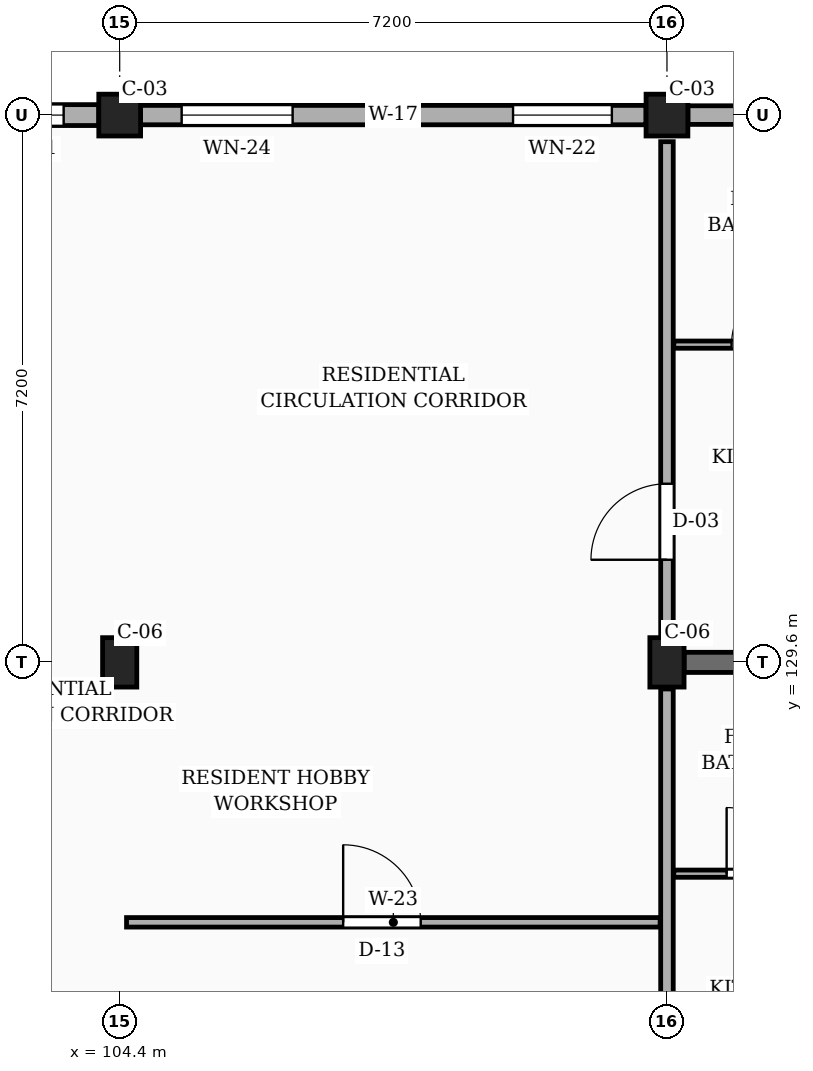
"""IFC4 building model, lengths in metres.
Left out: names, types, materials, properties, quantities, classifications, styles, units other than length and angle.
Written with IfcOpenShell. Run it as: python <this file> out.ifc"""

import sys

from ifc_helpers import new_model, si_unit, direction, frame, frame_2d, origin, origin_2d, place, context, subcontext, project, spatial, rectangle, extrude, element, fill, save


model = new_model("IFC4")
c1 = context("Model", 3, precision=1e-05, world=origin(), true_north=direction((0.0, 1.0)))
c2 = subcontext(c1, "Body", "Model", "MODEL_VIEW")
j1 = project(units=[si_unit("LENGTHUNIT", "METRE"), si_unit("PLANEANGLEUNIT", "RADIAN")], contexts=[c1])
p1 = place(None, origin())
s1 = spatial("IfcSite", under=j1, at=p1, CompositionType="ELEMENT")
p2 = place(p1, origin())
s2 = spatial("IfcBuilding", under=s1, at=p2, CompositionType="ELEMENT")
p3 = place(p2, frame((0.0, 0.0, 10.8)))
s3 = spatial("IfcBuildingStorey", under=s2, at=p3, CompositionType="ELEMENT", Elevation=10.8)
p4 = place(p3, frame((104.4, 129.6, 0.0), z_axis=(0.0, 0.0, 1.0), x_axis=(1.0, 0.0, 0.0)))
e1 = element("IfcColumn", 1, at=p4, inside=s3, PredefinedType="COLUMN", context=c2, shape_type="SweptSolid", body=[
    extrude(rectangle(XDim=0.45, YDim=0.65, at=origin_2d()), origin(), (0.0, 0.0, 1.0), 3.15),
])
p5 = place(p3, frame((104.4, 136.8, 0.0), z_axis=(0.0, 0.0, 1.0), x_axis=(1.0, 0.0, 0.0)))
e2 = element("IfcColumn", 2, at=p5, inside=s3, PredefinedType="COLUMN", context=c2, shape_type="SweptSolid", body=[
    extrude(rectangle(XDim=0.55, YDim=0.55, at=origin_2d()), origin(), (0.0, 0.0, 1.0), 3.15),
])
p6 = place(p3, frame((111.6, 129.6, 0.0), z_axis=(0.0, 0.0, 1.0), x_axis=(1.0, 0.0, 0.0)))
e3 = element("IfcColumn", 3, at=p6, inside=s3, PredefinedType="COLUMN", context=c2, shape_type="SweptSolid", body=[
    extrude(rectangle(XDim=0.45, YDim=0.65, at=origin_2d()), origin(), (0.0, 0.0, 1.0), 3.15),
])
p7 = place(p3, frame((111.6, 136.8, 0.0), z_axis=(0.0, 0.0, 1.0), x_axis=(1.0, 0.0, 0.0)))
e4 = element("IfcColumn", 4, at=p7, inside=s3, PredefinedType="COLUMN", context=c2, shape_type="SweptSolid", body=[
    extrude(rectangle(XDim=0.55, YDim=0.55, at=origin_2d()), origin(), (0.0, 0.0, 1.0), 3.15),
])
p8 = place(p3, frame((111.825, 129.6, 0.0), z_axis=(0.0, 0.0, 1.0), x_axis=(1.0, 0.0, 0.0)))
e5 = element("IfcWall", 5, at=p8, inside=s3, PredefinedType="SOLIDWALL", context=c2, shape_type="SweptSolid", body=[
    extrude(rectangle(XDim=6.7, YDim=0.265, at=frame_2d((3.35, 0.0))), origin(), (0.0, 0.0, 1.0), 2.19),
])
p9 = place(p3, frame((118.525, 136.8, 0.0), z_axis=(0.0, 0.0, 1.0), x_axis=(-1.0, 0.0, 0.0)))
e6 = element("IfcWall", 6, at=p9, inside=s3, PredefinedType="SOLIDWALL", context=c2, shape_type="SweptSolid", body=[
    extrude(rectangle(XDim=6.65, YDim=0.245, at=frame_2d((3.325, 0.0))), origin(), (0.0, 0.0, 1.0), 2.46),
])
p10 = place(p9, frame((0.45, 0.0, 0.78)))
e7 = element("IfcOpeningElement", 7, at=p10, cuts=e6, PredefinedType="OPENING", context=c2, shape_type="SweptSolid", body=[
    extrude(rectangle(XDim=1.14, YDim=1.36, at=frame_2d((0.57, 0.68))), frame((0.0, 0.133, 0.0), z_axis=(0.0, -1.0, 0.0), x_axis=(1.0, 0.0, 0.0)), (0.0, 0.0, 1.0), 0.265),
])
p11 = place(p9, frame((4.65, 0.0, 0.78)))
e8 = element("IfcOpeningElement", 8, at=p11, cuts=e6, PredefinedType="OPENING", context=c2, shape_type="SweptSolid", body=[
    extrude(rectangle(XDim=1.3, YDim=1.36, at=frame_2d((0.65, 0.68))), frame((0.0, 0.133, 0.0), z_axis=(0.0, -1.0, 0.0), x_axis=(1.0, 0.0, 0.0)), (0.0, 0.0, 1.0), 0.265),
])
p12 = place(p3, frame((111.325, 136.8, 0.0), z_axis=(0.0, 0.0, 1.0), x_axis=(-1.0, 0.0, 0.0)))
e9 = element("IfcWall", 9, at=p12, inside=s3, PredefinedType="SOLIDWALL", context=c2, shape_type="SweptSolid", body=[
    extrude(rectangle(XDim=6.65, YDim=0.255, at=frame_2d((3.325, 0.0))), origin(), (0.0, 0.0, 1.0), 2.46),
])
p13 = place(p12, frame((0.45, 0.0, 0.78)))
e10 = element("IfcOpeningElement", 10, at=p13, cuts=e9, PredefinedType="OPENING", context=c2, shape_type="SweptSolid", body=[
    extrude(rectangle(XDim=1.3, YDim=1.36, at=frame_2d((0.65, 0.68))), frame((0.0, 0.137, 0.0), z_axis=(0.0, -1.0, 0.0), x_axis=(1.0, 0.0, 0.0)), (0.0, 0.0, 1.0), 0.275),
])
p14 = place(p12, frame((4.65, 0.0, 0.78)))
e11 = element("IfcOpeningElement", 11, at=p14, cuts=e9, PredefinedType="OPENING", context=c2, shape_type="SweptSolid", body=[
    extrude(rectangle(XDim=1.46, YDim=1.36, at=frame_2d((0.73, 0.68))), frame((0.0, 0.137, 0.0), z_axis=(0.0, -1.0, 0.0), x_axis=(1.0, 0.0, 0.0)), (0.0, 0.0, 1.0), 0.275),
])
p15 = place(p3, frame((104.125, 136.8, 0.0), z_axis=(0.0, 0.0, 1.0), x_axis=(-1.0, 0.0, 0.0)))
e12 = element("IfcWall", 12, at=p15, inside=s3, PredefinedType="SOLIDWALL", context=c2, shape_type="SweptSolid", body=[
    extrude(rectangle(XDim=6.65, YDim=0.275, at=frame_2d((3.325, 0.0))), origin(), (0.0, 0.0, 1.0), 2.46),
])
p16 = place(p15, frame((0.462, 0.0, 0.78)))
e13 = element("IfcOpeningElement", 13, at=p16, cuts=e12, PredefinedType="OPENING", context=c2, shape_type="SweptSolid", body=[
    extrude(rectangle(XDim=1.04, YDim=1.26, at=frame_2d((0.52, 0.63))), frame((0.0, 0.147, 0.0), z_axis=(0.0, -1.0, 0.0), x_axis=(1.0, 0.0, 0.0)), (0.0, 0.0, 1.0), 0.295),
])
p17 = place(p15, frame((3.505, 0.0, 0.78)))
e14 = element("IfcOpeningElement", 14, at=p17, cuts=e12, PredefinedType="OPENING", context=c2, shape_type="SweptSolid", body=[
    extrude(rectangle(XDim=1.05, YDim=1.44, at=frame_2d((0.525, 0.72))), frame((0.0, 0.147, 0.0), z_axis=(0.0, -1.0, 0.0), x_axis=(1.0, 0.0, 0.0)), (0.0, 0.0, 1.0), 0.295),
])
p18 = place(p3, frame((111.6, 122.75, 0.0), z_axis=(0.0, 0.0, 1.0), x_axis=(0.0, 1.0, 0.0)))
e15 = element("IfcWall", 15, at=p18, inside=s3, PredefinedType="PARTITIONING", context=c2, shape_type="SweptSolid", body=[
    extrude(rectangle(XDim=6.5, YDim=0.165, at=frame_2d((3.25, 0.0))), origin(), (0.0, 0.0, 1.0), 2.24),
])
p19 = place(p18, frame((1.0, 0.0, 0.0)))
e16 = element("IfcOpeningElement", 16, at=p19, cuts=e15, PredefinedType="OPENING", context=c2, shape_type="SweptSolid", body=[
    extrude(rectangle(XDim=1.14, YDim=2.18, at=frame_2d((0.57, 1.09))), frame((0.0, 0.093, 0.0), z_axis=(0.0, -1.0, 0.0), x_axis=(1.0, 0.0, 0.0)), (0.0, 0.0, 1.0), 0.185),
])
p20 = place(p3, frame((111.6, 129.95, 0.0), z_axis=(0.0, 0.0, 1.0), x_axis=(0.0, 1.0, 0.0)))
e17 = element("IfcWall", 17, at=p20, inside=s3, PredefinedType="PARTITIONING", context=c2, shape_type="SweptSolid", body=[
    extrude(rectangle(XDim=6.5, YDim=0.165, at=frame_2d((3.25, 0.0))), origin(), (0.0, 0.0, 1.0), 2.24),
])
p21 = place(p20, frame((1.0, 0.0, 0.0)))
e18 = element("IfcOpeningElement", 18, at=p21, cuts=e17, PredefinedType="OPENING", context=c2, shape_type="SweptSolid", body=[
    extrude(rectangle(XDim=1.0, YDim=2.15, at=frame_2d((0.5, 1.075))), frame((0.0, 0.093, 0.0), z_axis=(0.0, -1.0, 0.0), x_axis=(1.0, 0.0, 0.0)), (0.0, 0.0, 1.0), 0.185),
])
p22 = place(p3, frame((104.49, 126.18, 0.0), z_axis=(0.0, 0.0, 1.0), x_axis=(1.0, 0.0, 0.0)))
e19 = element("IfcWall", 19, at=p22, inside=s3, PredefinedType="PARTITIONING", context=c2, shape_type="SweptSolid", body=[
    extrude(rectangle(XDim=7.02, YDim=0.125, at=frame_2d((3.51, 0.0))), origin(), (0.0, 0.0, 1.0), 2.325),
])
p23 = place(p22, frame((2.85, 0.0, 0.0)))
e20 = element("IfcOpeningElement", 20, at=p23, cuts=e19, PredefinedType="OPENING", context=c2, shape_type="SweptSolid", body=[
    extrude(rectangle(XDim=1.02, YDim=2.15, at=frame_2d((0.51, 1.075))), frame((0.0, 0.073, 0.0), z_axis=(0.0, -1.0, 0.0), x_axis=(1.0, 0.0, 0.0)), (0.0, 0.0, 1.0), 0.145),
])
p24 = place(p3, frame((111.69, 126.82, 0.0), z_axis=(0.0, 0.0, 1.0), x_axis=(1.0, 0.0, 0.0)))
e21 = element("IfcWall", 21, at=p24, inside=s3, PredefinedType="PARTITIONING", context=c2, shape_type="SweptSolid", body=[
    extrude(rectangle(XDim=2.26, YDim=0.095, at=frame_2d((1.13, 0.0))), origin(), (0.0, 0.0, 1.0), 2.325),
])
p25 = place(p24, frame((0.695, 0.0, 0.0)))
e22 = element("IfcOpeningElement", 22, at=p25, cuts=e21, PredefinedType="OPENING", context=c2, shape_type="SweptSolid", body=[
    extrude(rectangle(XDim=0.87, YDim=2.05, at=frame_2d((0.435, 1.025))), frame((0.0, 0.058, 0.0), z_axis=(0.0, -1.0, 0.0), x_axis=(1.0, 0.0, 0.0)), (0.0, 0.0, 1.0), 0.115),
])
p26 = place(p3, frame((111.69, 133.78, 0.0), z_axis=(0.0, 0.0, 1.0), x_axis=(1.0, 0.0, 0.0)))
e23 = element("IfcWall", 23, at=p26, inside=s3, PredefinedType="PARTITIONING", context=c2, shape_type="SweptSolid", body=[
    extrude(rectangle(XDim=2.42, YDim=0.095, at=frame_2d((1.21, 0.0))), origin(), (0.0, 0.0, 1.0), 2.325),
])
p27 = place(p26, frame((0.76, 0.0, 0.0)))
e24 = element("IfcOpeningElement", 24, at=p27, cuts=e23, PredefinedType="OPENING", context=c2, shape_type="SweptSolid", body=[
    extrude(rectangle(XDim=0.9, YDim=2.05, at=frame_2d((0.45, 1.025))), frame((0.0, 0.058, 0.0), z_axis=(0.0, -1.0, 0.0), x_axis=(1.0, 0.0, 0.0)), (0.0, 0.0, 1.0), 0.115),
])
p28 = place(p13, origin())
e25 = element("IfcWindow", 25, at=p28, inside=s3, PartitioningType="SINGLE_PANEL", PredefinedType="WINDOW", context=c2, shape_type="SweptSolid", body=[
    extrude(rectangle(XDim=1.3, YDim=1.36, at=frame_2d((0.65, 0.68))), frame((0.0, 0.03, 0.0), z_axis=(0.0, -1.0, 0.0), x_axis=(1.0, 0.0, 0.0)), (0.0, 0.0, 1.0), 0.06),
])
fill(e10, e25)
p29 = place(p14, origin())
e26 = element("IfcWindow", 26, at=p29, inside=s3, PartitioningType="SINGLE_PANEL", PredefinedType="WINDOW", context=c2, shape_type="SweptSolid", body=[
    extrude(rectangle(XDim=1.46, YDim=1.36, at=frame_2d((0.73, 0.68))), frame((0.0, 0.03, 0.0), z_axis=(0.0, -1.0, 0.0), x_axis=(1.0, 0.0, 0.0)), (0.0, 0.0, 1.0), 0.06),
])
fill(e11, e26)
p30 = place(p16, origin())
e27 = element("IfcWindow", 27, at=p30, inside=s3, PartitioningType="SINGLE_PANEL", PredefinedType="WINDOW", context=c2, shape_type="SweptSolid", body=[
    extrude(rectangle(XDim=1.04, YDim=1.26, at=frame_2d((0.52, 0.63))), frame((0.0, 0.03, 0.0), z_axis=(0.0, -1.0, 0.0), x_axis=(1.0, 0.0, 0.0)), (0.0, 0.0, 1.0), 0.06),
])
fill(e13, e27)
p31 = place(p21, origin())
e28 = element("IfcDoor", 28, at=p31, inside=s3, OperationType="SINGLE_SWING_LEFT", PredefinedType="DOOR", context=c2, shape_type="SweptSolid", body=[
    extrude(rectangle(XDim=1.0, YDim=2.15, at=frame_2d((0.5, 1.075))), frame((0.0, 0.025, 0.0), z_axis=(0.0, -1.0, 0.0), x_axis=(1.0, 0.0, 0.0)), (0.0, 0.0, 1.0), 0.05),
])
fill(e18, e28)
p32 = place(p23, origin())
e29 = element("IfcDoor", 29, at=p32, inside=s3, OperationType="SINGLE_SWING_LEFT", PredefinedType="DOOR", context=c2, shape_type="SweptSolid", body=[
    extrude(rectangle(XDim=1.02, YDim=2.15, at=frame_2d((0.51, 1.075))), frame((0.0, 0.025, 0.0), z_axis=(0.0, -1.0, 0.0), x_axis=(1.0, 0.0, 0.0)), (0.0, 0.0, 1.0), 0.05),
])
fill(e20, e29)
p33 = place(p25, origin())
e30 = element("IfcDoor", 30, at=p33, inside=s3, OperationType="SINGLE_SWING_LEFT", PredefinedType="DOOR", context=c2, shape_type="SweptSolid", body=[
    extrude(rectangle(XDim=0.87, YDim=2.05, at=frame_2d((0.435, 1.025))), frame((0.0, 0.025, 0.0), z_axis=(0.0, -1.0, 0.0), x_axis=(1.0, 0.0, 0.0)), (0.0, 0.0, 1.0), 0.05),
])
fill(e22, e30)
p34 = place(p27, origin())
e31 = element("IfcDoor", 31, at=p34, inside=s3, OperationType="SINGLE_SWING_RIGHT", PredefinedType="DOOR", context=c2, shape_type="SweptSolid", body=[
    extrude(rectangle(XDim=0.9, YDim=2.05, at=frame_2d((0.45, 1.025))), frame((0.0, 0.025, 0.0), z_axis=(0.0, -1.0, 0.0), x_axis=(1.0, 0.0, 0.0)), (0.0, 0.0, 1.0), 0.05),
])
fill(e24, e31)
save(model, sys.argv[1])
